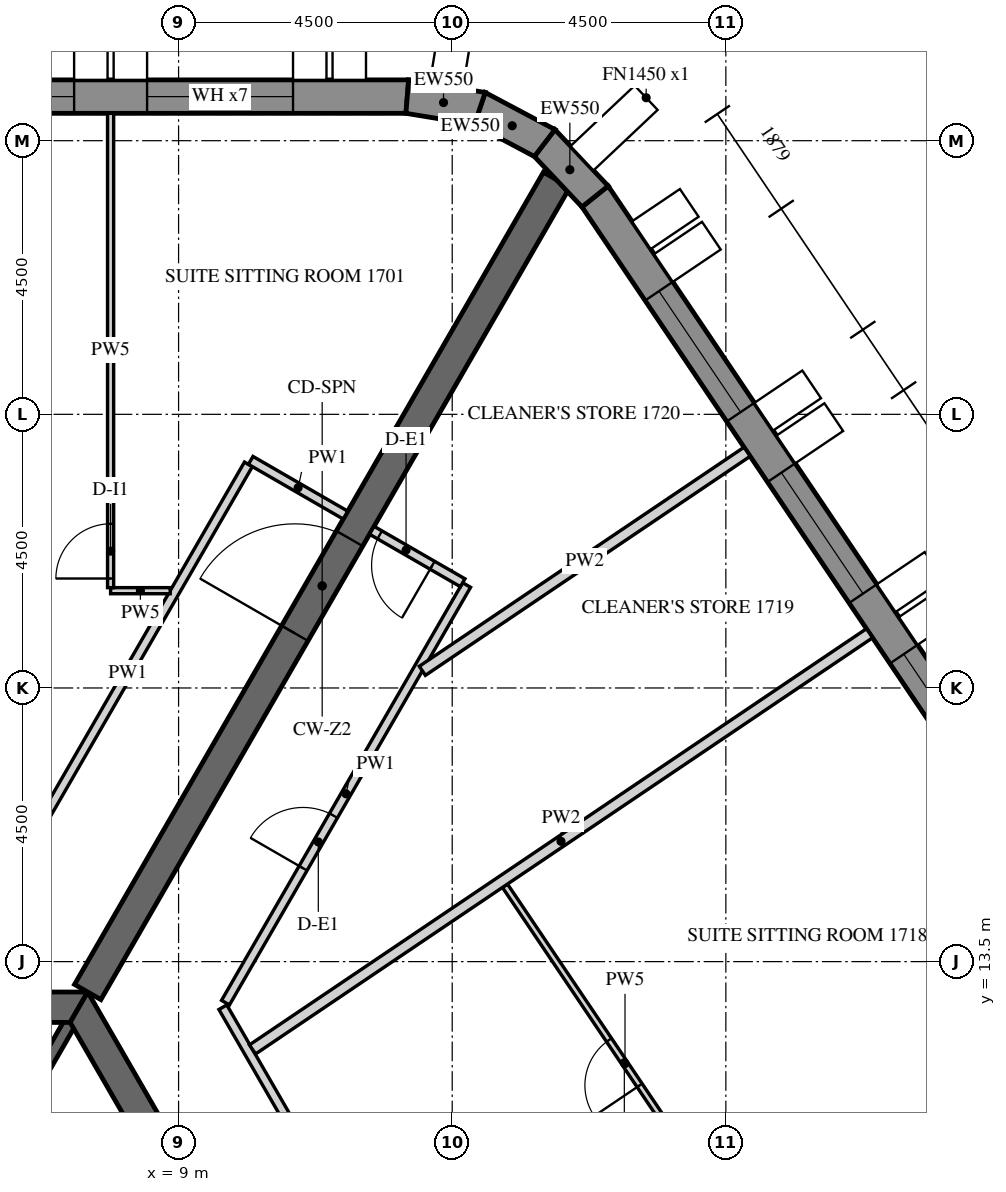
"""IFC4 building model, lengths in metres.
Left out: names, types, materials, properties, quantities, classifications, styles, units other than length and angle.
Written with IfcOpenShell. Run it as: python <this file> out.ifc"""

import sys

from ifc_helpers import new_model, si_unit, direction, frame, frame_2d, origin, place, context, subcontext, project, spatial, polyline, rectangle, outline, extrude, element, fill, save


model = new_model("IFC4")
c1 = context("Model", 3, precision=1e-05, world=origin(), true_north=direction((0.0, 1.0)))
c2 = subcontext(c1, "Body", "Model", "MODEL_VIEW")
j1 = project(units=[si_unit("LENGTHUNIT", "METRE"), si_unit("PLANEANGLEUNIT", "RADIAN")], contexts=[c1])
p1 = place(None, origin())
s1 = spatial("IfcSite", under=j1, at=p1, CompositionType="ELEMENT")
p2 = place(p1, origin())
s2 = spatial("IfcBuilding", under=s1, at=p2, CompositionType="ELEMENT")
p3 = place(p2, frame((0.0, 0.0, 215.1)))
s3 = spatial("IfcBuildingStorey", under=s2, at=p3, CompositionType="ELEMENT", Elevation=215.1)
p4 = place(p3, frame((12.761, 27.725, -0.15), z_axis=(0.0, 0.0, 1.0), x_axis=(-1.0, 0.0, 0.0)))
e1 = element("IfcWall", 1, at=p4, inside=s3, PredefinedType="SOLIDWALL", context=c2, shape_type="SweptSolid", body=[
    extrude(outline(polyline([(-0.022, -0.275), (27.783, -0.275), (27.732, 0.275), (0.022, 0.275), (-0.022, -0.275)])), origin(), (0.0, 0.0, 1.0), 3.9),
])
p5 = place(p4, frame((1.879, 0.0, 1.05)))
e2 = element("IfcOpeningElement", 2, at=p5, cuts=e1, PredefinedType="OPENING", context=c2, shape_type="SweptSolid", body=[
    extrude(rectangle(XDim=2.4, YDim=2.4, at=frame_2d((1.2, 1.2))), frame((0.0, 0.285, 0.0), z_axis=(0.0, -1.0, 0.0), x_axis=(1.0, 0.0, 0.0)), (0.0, 0.0, 1.0), 0.57),
])
p6 = place(p4, frame((5.479, 0.0, 1.05)))
e3 = element("IfcOpeningElement", 3, at=p6, cuts=e1, PredefinedType="OPENING", context=c2, shape_type="SweptSolid", body=[
    extrude(rectangle(XDim=2.4, YDim=2.4, at=frame_2d((1.2, 1.2))), frame((0.0, 0.285, 0.0), z_axis=(0.0, -1.0, 0.0), x_axis=(1.0, 0.0, 0.0)), (0.0, 0.0, 1.0), 0.57),
])
p7 = place(p4, frame((9.079, 0.0, 1.05)))
e4 = element("IfcOpeningElement", 4, at=p7, cuts=e1, PredefinedType="OPENING", context=c2, shape_type="SweptSolid", body=[
    extrude(rectangle(XDim=2.4, YDim=2.4, at=frame_2d((1.2, 1.2))), frame((0.0, 0.285, 0.0), z_axis=(0.0, -1.0, 0.0), x_axis=(1.0, 0.0, 0.0)), (0.0, 0.0, 1.0), 0.57),
])
p8 = place(p4, frame((12.679, 0.0, 1.05)))
e5 = element("IfcOpeningElement", 5, at=p8, cuts=e1, PredefinedType="OPENING", context=c2, shape_type="SweptSolid", body=[
    extrude(rectangle(XDim=2.4, YDim=2.4, at=frame_2d((1.2, 1.2))), frame((0.0, 0.285, 0.0), z_axis=(0.0, -1.0, 0.0), x_axis=(1.0, 0.0, 0.0)), (0.0, 0.0, 1.0), 0.57),
])
p9 = place(p4, frame((16.279, 0.0, 1.05)))
e6 = element("IfcOpeningElement", 6, at=p9, cuts=e1, PredefinedType="OPENING", context=c2, shape_type="SweptSolid", body=[
    extrude(rectangle(XDim=2.4, YDim=2.4, at=frame_2d((1.2, 1.2))), frame((0.0, 0.285, 0.0), z_axis=(0.0, -1.0, 0.0), x_axis=(1.0, 0.0, 0.0)), (0.0, 0.0, 1.0), 0.57),
])
p10 = place(p4, frame((19.879, 0.0, 1.05)))
e7 = element("IfcOpeningElement", 7, at=p10, cuts=e1, PredefinedType="OPENING", context=c2, shape_type="SweptSolid", body=[
    extrude(rectangle(XDim=2.4, YDim=2.4, at=frame_2d((1.2, 1.2))), frame((0.0, 0.285, 0.0), z_axis=(0.0, -1.0, 0.0), x_axis=(1.0, 0.0, 0.0)), (0.0, 0.0, 1.0), 0.57),
])
p11 = place(p4, frame((23.479, 0.0, 1.05)))
e8 = element("IfcOpeningElement", 8, at=p11, cuts=e1, PredefinedType="OPENING", context=c2, shape_type="SweptSolid", body=[
    extrude(rectangle(XDim=2.4, YDim=2.4, at=frame_2d((1.2, 1.2))), frame((0.0, 0.285, 0.0), z_axis=(0.0, -1.0, 0.0), x_axis=(1.0, 0.0, 0.0)), (0.0, 0.0, 1.0), 0.57),
])
p12 = place(p3, frame((31.371, 3.071, -0.15), z_axis=(0.0, 0.0, 1.0), x_axis=(-0.559189891278, 0.829039604297, 0.0)))
e9 = element("IfcWall", 9, at=p12, inside=s3, PredefinedType="SOLIDWALL", context=c2, shape_type="SweptSolid", body=[
    extrude(outline(polyline([(-0.026, -0.275), (27.781, -0.275), (27.736, 0.275), (0.026, 0.275), (-0.026, -0.275)])), origin(), (0.0, 0.0, 1.0), 3.9),
])
p13 = place(p12, frame((1.879, 0.0, 1.05)))
e10 = element("IfcOpeningElement", 10, at=p13, cuts=e9, PredefinedType="OPENING", context=c2, shape_type="SweptSolid", body=[
    extrude(rectangle(XDim=2.4, YDim=2.4, at=frame_2d((1.2, 1.2))), frame((0.0, 0.285, 0.0), z_axis=(0.0, -1.0, 0.0), x_axis=(1.0, 0.0, 0.0)), (0.0, 0.0, 1.0), 0.57),
])
p14 = place(p12, frame((5.479, 0.0, 1.05)))
e11 = element("IfcOpeningElement", 11, at=p14, cuts=e9, PredefinedType="OPENING", context=c2, shape_type="SweptSolid", body=[
    extrude(rectangle(XDim=2.4, YDim=2.4, at=frame_2d((1.2, 1.2))), frame((0.0, 0.285, 0.0), z_axis=(0.0, -1.0, 0.0), x_axis=(1.0, 0.0, 0.0)), (0.0, 0.0, 1.0), 0.57),
])
p15 = place(p12, frame((9.079, 0.0, 1.05)))
e12 = element("IfcOpeningElement", 12, at=p15, cuts=e9, PredefinedType="OPENING", context=c2, shape_type="SweptSolid", body=[
    extrude(rectangle(XDim=2.4, YDim=2.4, at=frame_2d((1.2, 1.2))), frame((0.0, 0.285, 0.0), z_axis=(0.0, -1.0, 0.0), x_axis=(1.0, 0.0, 0.0)), (0.0, 0.0, 1.0), 0.57),
])
p16 = place(p12, frame((12.679, 0.0, 1.05)))
e13 = element("IfcOpeningElement", 13, at=p16, cuts=e9, PredefinedType="OPENING", context=c2, shape_type="SweptSolid", body=[
    extrude(rectangle(XDim=2.4, YDim=2.4, at=frame_2d((1.2, 1.2))), frame((0.0, 0.285, 0.0), z_axis=(0.0, -1.0, 0.0), x_axis=(1.0, 0.0, 0.0)), (0.0, 0.0, 1.0), 0.57),
])
p17 = place(p12, frame((16.279, 0.0, 1.05)))
e14 = element("IfcOpeningElement", 14, at=p17, cuts=e9, PredefinedType="OPENING", context=c2, shape_type="SweptSolid", body=[
    extrude(rectangle(XDim=2.4, YDim=2.4, at=frame_2d((1.2, 1.2))), frame((0.0, 0.285, 0.0), z_axis=(0.0, -1.0, 0.0), x_axis=(1.0, 0.0, 0.0)), (0.0, 0.0, 1.0), 0.57),
])
p18 = place(p12, frame((19.879, 0.0, 1.05)))
e15 = element("IfcOpeningElement", 15, at=p18, cuts=e9, PredefinedType="OPENING", context=c2, shape_type="SweptSolid", body=[
    extrude(rectangle(XDim=2.4, YDim=2.4, at=frame_2d((1.2, 1.2))), frame((0.0, 0.285, 0.0), z_axis=(0.0, -1.0, 0.0), x_axis=(1.0, 0.0, 0.0)), (0.0, 0.0, 1.0), 0.57),
])
p19 = place(p12, frame((23.479, 0.0, 1.05)))
e16 = element("IfcOpeningElement", 16, at=p19, cuts=e9, PredefinedType="OPENING", context=c2, shape_type="SweptSolid", body=[
    extrude(rectangle(XDim=2.4, YDim=2.4, at=frame_2d((1.2, 1.2))), frame((0.0, 0.285, 0.0), z_axis=(0.0, -1.0, 0.0), x_axis=(1.0, 0.0, 0.0)), (0.0, 0.0, 1.0), 0.57),
])
p20 = place(p3, frame((15.849, 26.083, -0.15), z_axis=(0.0, 0.0, 1.0), x_axis=(-0.686196220404, 0.727416488061, 0.0)))
e17 = element("IfcWall", 17, at=p20, inside=s3, PredefinedType="SOLIDWALL", context=c2, shape_type="SweptSolid", body=[
    extrude(outline(polyline([(-0.022, -0.275), (1.253, -0.275), (1.163, 0.275), (0.022, 0.275), (-0.022, -0.275)])), origin(), (0.0, 0.0, 1.0), 3.9),
])
p21 = place(p3, frame((15.02, 26.962, -0.15), z_axis=(0.0, 0.0, 1.0), x_axis=(-0.882950818639, 0.469465495926, 0.0)))
e18 = element("IfcWall", 18, at=p21, inside=s3, PredefinedType="SOLIDWALL", context=c2, shape_type="SweptSolid", body=[
    extrude(outline(polyline([(-0.045, -0.275), (1.253, -0.275), (1.163, 0.275), (0.045, 0.275), (-0.045, -0.275)])), origin(), (0.0, 0.0, 1.0), 3.9),
])
p22 = place(p3, frame((13.953, 27.529, -0.15), z_axis=(0.0, 0.0, 1.0), x_axis=(-0.986751945211, 0.162236243244, 0.0)))
e19 = element("IfcWall", 19, at=p22, inside=s3, PredefinedType="SOLIDWALL", context=c2, shape_type="SweptSolid", body=[
    extrude(outline(polyline([(-0.045, -0.275), (1.231, -0.275), (1.186, 0.275), (0.045, 0.275), (-0.045, -0.275)])), origin(), (0.0, 0.0, 1.0), 3.9),
])
p23 = place(p3, frame((14.722, 0.0, -0.15), z_axis=(0.0, 0.0, 1.0), x_axis=(-0.50000571537, 0.866022103989, 0.0)))
e20 = element("IfcWall", 20, at=p23, inside=s3, PredefinedType="SHEAR", context=c2, shape_type="SweptSolid", body=[
    extrude(outline(polyline([(-0.144, -0.25), (14.867, -0.25), (14.578, 0.25), (0.144, 0.25), (-0.144, -0.25)])), origin(), (0.0, 0.0, 1.0), 3.9),
])
p24 = place(p23, frame((6.432, 0.0, 0.15)))
e21 = element("IfcOpeningElement", 21, at=p24, cuts=e20, PredefinedType="OPENING", context=c2, shape_type="SweptSolid", body=[
    extrude(rectangle(XDim=1.8, YDim=2.4, at=frame_2d((0.9, 1.2))), frame((0.0, 0.26, 0.0), z_axis=(0.0, -1.0, 0.0), x_axis=(1.0, 0.0, 0.0)), (0.0, 0.0, 1.0), 0.52),
])
p25 = place(p3, frame((7.361, 12.75, -0.15), z_axis=(0.0, 0.0, 1.0), x_axis=(-1.0, 0.0, 0.0)))
e22 = element("IfcWall", 22, at=p25, inside=s3, PredefinedType="SHEAR", context=c2, shape_type="SweptSolid", body=[
    extrude(outline(polyline([(-0.144, -0.25), (14.866, -0.25), (14.578, 0.25), (0.144, 0.25), (-0.144, -0.25)])), origin(), (0.0, 0.0, 1.0), 3.9),
])
p26 = place(p25, frame((6.761, 0.0, 0.15)))
e23 = element("IfcOpeningElement", 23, at=p26, cuts=e22, PredefinedType="OPENING", context=c2, shape_type="SweptSolid", body=[
    extrude(rectangle(XDim=1.2, YDim=2.4, at=frame_2d((0.6, 1.2))), frame((0.0, 0.26, 0.0), z_axis=(0.0, -1.0, 0.0), x_axis=(1.0, 0.0, 0.0)), (0.0, 0.0, 1.0), 0.52),
])
p27 = place(p3, frame((7.506, 13.0, -0.15), z_axis=(0.0, 0.0, 1.0), x_axis=(0.499988271576, 0.866032175087, 0.0)))
e24 = element("IfcWall", 24, at=p27, inside=s3, PredefinedType="SHEAR", context=c2, shape_type="SweptSolid", body=[
    extrude(rectangle(XDim=15.424, YDim=0.5, at=frame_2d((7.712, 0.0))), origin(), (0.0, 0.0, 1.0), 3.9),
])
p28 = place(p27, frame((6.812, 0.0, 0.15)))
e25 = element("IfcOpeningElement", 25, at=p28, cuts=e24, PredefinedType="OPENING", context=c2, shape_type="SweptSolid", body=[
    extrude(rectangle(XDim=1.8, YDim=2.4, at=frame_2d((0.9, 1.2))), frame((0.0, 0.26, 0.0), z_axis=(0.0, -1.0, 0.0), x_axis=(1.0, 0.0, 0.0)), (0.0, 0.0, 1.0), 0.52),
])
p29 = place(p3, frame((5.773, 10.0, -0.15), z_axis=(0.0, 0.0, 1.0), x_axis=(0.499995765644, 0.866027848477, 0.0)))
e26 = element("IfcWall", 26, at=p29, inside=s3, PredefinedType="SHEAR", context=c2, shape_type="SweptSolid", body=[
    extrude(rectangle(XDim=2.887, YDim=0.2, at=frame_2d((1.443, 0.0))), origin(), (0.0, 0.0, 1.0), 3.9),
])
p30 = place(p3, frame((10.149, 21.678, 0.0), z_axis=(0.0, 0.0, 1.0), x_axis=(-0.499997422768, -0.866026891745, 0.0)))
e27 = element("IfcWall", 27, at=p30, inside=s3, PredefinedType="PARTITIONING", context=c2, shape_type="SweptSolid", body=[
    extrude(rectangle(XDim=7.942, YDim=0.15, at=frame_2d((3.971, 0.0))), origin(), (0.0, 0.0, 1.0), 2.988),
])
p31 = place(p3, frame((11.745, 20.843, 0.0), z_axis=(0.0, 0.0, 1.0), x_axis=(-0.865989075817, 0.500062916607, 0.0)))
e28 = element("IfcWall", 28, at=p31, inside=s3, PredefinedType="PARTITIONING", context=c2, shape_type="SweptSolid", body=[
    extrude(rectangle(XDim=1.8, YDim=0.15, at=frame_2d((0.9, 0.0))), origin(), (0.0, 0.0, 1.0), 2.988),
])
p32 = place(p3, frame((17.046, 0.075, 0.0), z_axis=(0.0, 0.0, 1.0), x_axis=(-0.500008833422, 0.866020303746, 0.0)))
e29 = element("IfcWall", 29, at=p32, inside=s3, PredefinedType="PARTITIONING", context=c2, shape_type="SweptSolid", body=[
    extrude(rectangle(XDim=14.636, YDim=0.15, at=frame_2d((7.318, 0.0))), origin(), (0.0, 0.0, 1.0), 2.988),
])
p33 = place(p32, frame((9.07, 0.0, 0.0)))
e30 = element("IfcOpeningElement", 30, at=p33, cuts=e29, PredefinedType="OPENING", context=c2, shape_type="SweptSolid", body=[
    extrude(rectangle(XDim=1.0, YDim=2.1, at=frame_2d((0.5, 1.05))), frame((0.0, 0.085, 0.0), z_axis=(0.0, -1.0, 0.0), x_axis=(1.0, 0.0, 0.0)), (0.0, 0.0, 1.0), 0.17),
])
p34 = place(p3, frame((9.772, 12.825, 0.0), z_axis=(0.0, 0.0, 1.0), x_axis=(0.499989830942, 0.866031274813, 0.0)))
e31 = element("IfcWall", 31, at=p34, inside=s3, PredefinedType="PARTITIONING", context=c2, shape_type="SweptSolid", body=[
    extrude(rectangle(XDim=7.93, YDim=0.15, at=frame_2d((3.965, 0.0))), origin(), (0.0, 0.0, 1.0), 2.988),
])
p35 = place(p34, frame((2.552, 0.0, 0.0)))
e32 = element("IfcOpeningElement", 32, at=p35, cuts=e31, PredefinedType="OPENING", context=c2, shape_type="SweptSolid", body=[
    extrude(rectangle(XDim=1.0, YDim=2.1, at=frame_2d((0.5, 1.05))), frame((0.0, 0.085, 0.0), z_axis=(0.0, -1.0, 0.0), x_axis=(1.0, 0.0, 0.0)), (0.0, 0.0, 1.0), 0.17),
])
p36 = place(p3, frame((13.672, 19.73, 0.0), z_axis=(0.0, 0.0, 1.0), x_axis=(-0.866074815912, 0.499914405916, 0.0)))
e33 = element("IfcWall", 33, at=p36, inside=s3, PredefinedType="PARTITIONING", context=c2, shape_type="SweptSolid", body=[
    extrude(rectangle(XDim=1.725, YDim=0.15, at=frame_2d((0.862, 0.0))), origin(), (0.0, 0.0, 1.0), 2.988),
])
p37 = place(p36, frame((0.575, 0.0, 0.0)))
e34 = element("IfcOpeningElement", 34, at=p37, cuts=e33, PredefinedType="OPENING", context=c2, shape_type="SweptSolid", body=[
    extrude(rectangle(XDim=1.0, YDim=2.1, at=frame_2d((0.5, 1.05))), frame((0.0, 0.085, 0.0), z_axis=(0.0, -1.0, 0.0), x_axis=(1.0, 0.0, 0.0)), (0.0, 0.0, 1.0), 0.17),
])
p38 = place(p3, frame((8.862, 19.6, 0.0), z_axis=(0.0, 0.0, 1.0), x_axis=(-1.0, 0.0, 0.0)))
e35 = element("IfcWall", 35, at=p38, inside=s3, PredefinedType="PARTITIONING", context=c2, shape_type="SweptSolid", body=[
    extrude(rectangle(XDim=0.98, YDim=0.1, at=frame_2d((0.49, 0.0))), origin(), (0.0, 0.0, 1.0), 2.988),
])
p39 = place(p3, frame((7.882, 19.65, 0.0), z_axis=(0.0, 0.0, 1.0), x_axis=(0.0, 1.0, 0.0)))
e36 = element("IfcWall", 36, at=p39, inside=s3, PredefinedType="PARTITIONING", context=c2, shape_type="SweptSolid", body=[
    extrude(rectangle(XDim=7.8, YDim=0.1, at=frame_2d((3.9, 0.0))), origin(), (0.0, 0.0, 1.0), 2.988),
])
p40 = place(p39, frame((0.15, 0.0, 0.0)))
e37 = element("IfcOpeningElement", 37, at=p40, cuts=e36, PredefinedType="OPENING", context=c2, shape_type="SweptSolid", body=[
    extrude(rectangle(XDim=0.9, YDim=2.1, at=frame_2d((0.45, 1.05))), frame((0.0, 0.06, 0.0), z_axis=(0.0, -1.0, 0.0), x_axis=(1.0, 0.0, 0.0)), (0.0, 0.0, 1.0), 0.12),
])
p41 = place(p3, frame((24.389, 12.931, 0.0), z_axis=(0.0, 0.0, 1.0), x_axis=(-0.829029895244, -0.559204285383, 0.0)))
e38 = element("IfcWall", 38, at=p41, inside=s3, PredefinedType="PARTITIONING", context=c2, shape_type="SweptSolid", body=[
    extrude(rectangle(XDim=7.292, YDim=0.1, at=frame_2d((3.646, 0.0))), origin(), (0.0, 0.0, 1.0), 2.988),
])
p42 = place(p3, frame((18.315, 8.895, 0.0), z_axis=(0.0, 0.0, 1.0), x_axis=(-0.559177045947, 0.829048268369, 0.0)))
e39 = element("IfcWall", 39, at=p42, inside=s3, PredefinedType="PARTITIONING", context=c2, shape_type="SweptSolid", body=[
    extrude(rectangle(XDim=7.06, YDim=0.1, at=frame_2d((3.53, 0.0))), origin(), (0.0, 0.0, 1.0), 2.988),
])
p43 = place(p42, frame((3.1, 0.0, 0.0)))
e40 = element("IfcOpeningElement", 40, at=p43, cuts=e39, PredefinedType="OPENING", context=c2, shape_type="SweptSolid", body=[
    extrude(rectangle(XDim=0.9, YDim=2.1, at=frame_2d((0.45, 1.05))), frame((0.0, 0.06, 0.0), z_axis=(0.0, -1.0, 0.0), x_axis=(1.0, 0.0, 0.0)), (0.0, 0.0, 1.0), 0.12),
])
p44 = place(p3, frame((20.363, 18.9, 0.0), z_axis=(0.0, 0.0, 1.0), x_axis=(-0.829030622766, -0.559203206819, 0.0)))
e41 = element("IfcWall", 41, at=p44, inside=s3, PredefinedType="PARTITIONING", context=c2, shape_type="SweptSolid", body=[
    extrude(rectangle(XDim=12.239, YDim=0.18, at=frame_2d((6.12, 0.0))), origin(), (0.0, 0.0, 1.0), 2.988),
])
p45 = place(p3, frame((18.35, 21.884, 0.0), z_axis=(0.0, 0.0, 1.0), x_axis=(-0.829047205772, -0.559178621374, 0.0)))
e42 = element("IfcWall", 42, at=p45, inside=s3, PredefinedType="PARTITIONING", context=c2, shape_type="SweptSolid", body=[
    extrude(rectangle(XDim=6.442, YDim=0.18, at=frame_2d((3.221, 0.0))), origin(), (0.0, 0.0, 1.0), 2.988),
])
p46 = place(p5, frame((0.0, 0.205, 0.0)))
e43 = element("IfcWindow", 43, at=p46, inside=s3, PartitioningType="DOUBLE_PANEL_VERTICAL", PredefinedType="WINDOW", context=c2, shape_type="SweptSolid", body=[
    extrude(rectangle(XDim=2.4, YDim=2.4, at=frame_2d((1.2, 1.2))), frame((0.0, 0.03, 0.0), z_axis=(0.0, -1.0, 0.0), x_axis=(1.0, 0.0, 0.0)), (0.0, 0.0, 1.0), 0.06),
])
fill(e2, e43)
p47 = place(p6, frame((0.0, 0.205, 0.0)))
e44 = element("IfcWindow", 44, at=p47, inside=s3, PartitioningType="DOUBLE_PANEL_VERTICAL", PredefinedType="WINDOW", context=c2, shape_type="SweptSolid", body=[
    extrude(rectangle(XDim=2.4, YDim=2.4, at=frame_2d((1.2, 1.2))), frame((0.0, 0.03, 0.0), z_axis=(0.0, -1.0, 0.0), x_axis=(1.0, 0.0, 0.0)), (0.0, 0.0, 1.0), 0.06),
])
fill(e3, e44)
p48 = place(p17, frame((0.0, 0.205, 0.0)))
e45 = element("IfcWindow", 45, at=p48, inside=s3, PartitioningType="DOUBLE_PANEL_VERTICAL", PredefinedType="WINDOW", context=c2, shape_type="SweptSolid", body=[
    extrude(rectangle(XDim=2.4, YDim=2.4, at=frame_2d((1.2, 1.2))), frame((0.0, 0.03, 0.0), z_axis=(0.0, -1.0, 0.0), x_axis=(1.0, 0.0, 0.0)), (0.0, 0.0, 1.0), 0.06),
])
fill(e14, e45)
p49 = place(p18, frame((0.0, 0.205, 0.0)))
e46 = element("IfcWindow", 46, at=p49, inside=s3, PartitioningType="DOUBLE_PANEL_VERTICAL", PredefinedType="WINDOW", context=c2, shape_type="SweptSolid", body=[
    extrude(rectangle(XDim=2.4, YDim=2.4, at=frame_2d((1.2, 1.2))), frame((0.0, 0.03, 0.0), z_axis=(0.0, -1.0, 0.0), x_axis=(1.0, 0.0, 0.0)), (0.0, 0.0, 1.0), 0.06),
])
fill(e15, e46)
p50 = place(p19, frame((0.0, 0.205, 0.0)))
e47 = element("IfcWindow", 47, at=p50, inside=s3, PartitioningType="DOUBLE_PANEL_VERTICAL", PredefinedType="WINDOW", context=c2, shape_type="SweptSolid", body=[
    extrude(rectangle(XDim=2.4, YDim=2.4, at=frame_2d((1.2, 1.2))), frame((0.0, 0.03, 0.0), z_axis=(0.0, -1.0, 0.0), x_axis=(1.0, 0.0, 0.0)), (0.0, 0.0, 1.0), 0.06),
])
fill(e16, e47)
p51 = place(p28, origin())
e48 = element("IfcDoor", 48, at=p51, inside=s3, OperationType="DOUBLE_DOOR_SINGLE_SWING", PredefinedType="DOOR", context=c2, shape_type="SweptSolid", body=[
    extrude(rectangle(XDim=1.8, YDim=2.4, at=frame_2d((0.9, 1.2))), frame((0.0, 0.025, 0.0), z_axis=(0.0, -1.0, 0.0), x_axis=(1.0, 0.0, 0.0)), (0.0, 0.0, 1.0), 0.05),
])
fill(e25, e48)
p52 = place(p40, origin())
e49 = element("IfcDoor", 49, at=p52, inside=s3, OperationType="SINGLE_SWING_RIGHT", PredefinedType="DOOR", context=c2, shape_type="SweptSolid", body=[
    extrude(rectangle(XDim=0.9, YDim=2.1, at=frame_2d((0.45, 1.05))), frame((0.0, 0.025, 0.0), z_axis=(0.0, -1.0, 0.0), x_axis=(1.0, 0.0, 0.0)), (0.0, 0.0, 1.0), 0.05),
])
fill(e37, e49)
p53 = place(p43, origin())
e50 = element("IfcDoor", 50, at=p53, inside=s3, OperationType="SINGLE_SWING_LEFT", PredefinedType="DOOR", context=c2, shape_type="SweptSolid", body=[
    extrude(rectangle(XDim=0.9, YDim=2.1, at=frame_2d((0.45, 1.05))), frame((0.0, 0.025, 0.0), z_axis=(0.0, -1.0, 0.0), x_axis=(1.0, 0.0, 0.0)), (0.0, 0.0, 1.0), 0.05),
])
fill(e40, e50)
p54 = place(p35, origin())
e51 = element("IfcDoor", 51, at=p54, inside=s3, OperationType="SINGLE_SWING_RIGHT", PredefinedType="DOOR", context=c2, shape_type="SweptSolid", body=[
    extrude(rectangle(XDim=1.0, YDim=2.1, at=frame_2d((0.5, 1.05))), frame((0.0, 0.025, 0.0), z_axis=(0.0, -1.0, 0.0), x_axis=(1.0, 0.0, 0.0)), (0.0, 0.0, 1.0), 0.05),
])
fill(e32, e51)
p55 = place(p37, origin())
e52 = element("IfcDoor", 52, at=p55, inside=s3, OperationType="SINGLE_SWING_LEFT", PredefinedType="DOOR", context=c2, shape_type="SweptSolid", body=[
    extrude(rectangle(XDim=1.0, YDim=2.1, at=frame_2d((0.5, 1.05))), frame((0.0, 0.025, 0.0), z_axis=(0.0, -1.0, 0.0), x_axis=(1.0, 0.0, 0.0)), (0.0, 0.0, 1.0), 0.05),
])
fill(e34, e52)
save(model, sys.argv[1])
